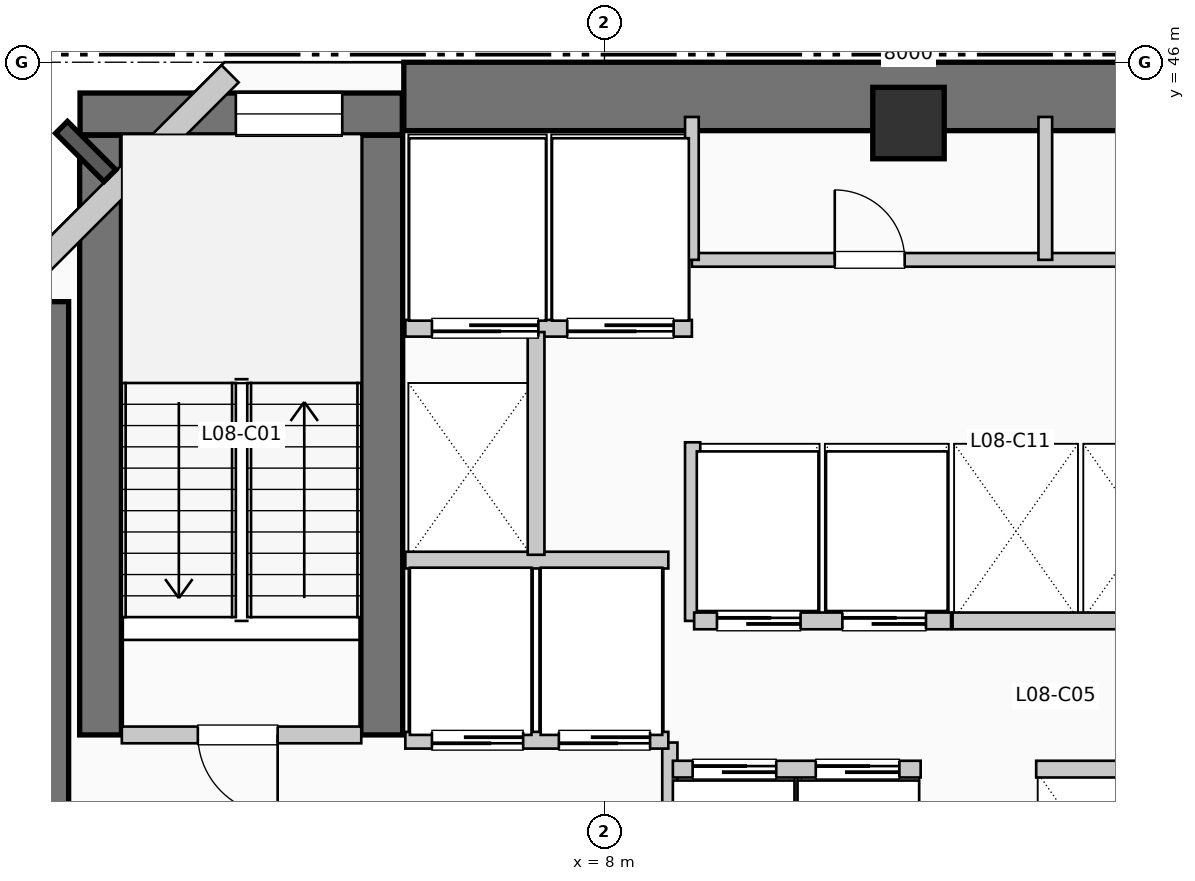
"""IFC4 building model, lengths in metres.
Left out: names, types, materials, properties, quantities, classifications, styles, units other than length and angle.
Written with IfcOpenShell. Run it as: python <this file> out.ifc"""

import sys

from ifc_helpers import new_model, si_unit, direction, frame, frame_2d, origin, origin_2d, place, context, subcontext, project, spatial, rectangle, extrude, element, fill, save


model = new_model("IFC4")
c1 = context("Model", 3, precision=1e-05, world=origin(), true_north=direction((0.0, 1.0)))
c2 = subcontext(c1, "Body", "Model", "MODEL_VIEW")
j1 = project(units=[si_unit("LENGTHUNIT", "METRE"), si_unit("PLANEANGLEUNIT", "RADIAN")], contexts=[c1])
p1 = place(None, origin())
s1 = spatial("IfcSite", under=j1, at=p1, CompositionType="ELEMENT")
p2 = place(p1, origin())
s2 = spatial("IfcBuilding", under=s1, at=p2, CompositionType="ELEMENT")
p3 = place(p2, frame((0.0, 0.0, 38.28)))
s3 = spatial("IfcBuildingStorey", under=s2, at=p3, CompositionType="ELEMENT", Elevation=38.28)
p4 = place(p3, frame((5.36, 45.55, 0.0), z_axis=(0.0, 0.0, 1.0), x_axis=(1.0, 0.0, 0.0)))
e1 = element("IfcWall", 1, at=p4, inside=s3, PredefinedType="SHEAR", context=c2, shape_type="SweptSolid", body=[
    extrude(rectangle(XDim=13.98, YDim=0.9, at=frame_2d((6.99, 0.0))), origin(), (0.0, 0.0, 1.0), 3.96),
])
p5 = place(p3, frame((0.5, 34.95, 0.0), z_axis=(0.0, 0.0, 1.0), x_axis=(0.0, 1.0, 0.0)))
e2 = element("IfcWall", 2, at=p5, inside=s3, PredefinedType="SHEAR", context=c2, shape_type="SweptSolid", body=[
    extrude(rectangle(XDim=7.9, YDim=0.9, at=frame_2d((3.95, 0.0))), origin(), (0.0, 0.0, 1.0), 3.96),
])
for number, where, z_axis, x_axis in (
    (3, (1.37, 37.15, 0.0), (0.0, 0.0, 1.0), (0.0, 1.0, 0.0)),
    (4, (5.07, 37.15, 0.0), (0.0, 0.0, 1.0), (0.0, 1.0, 0.0)),
):
    element("IfcWall", number, at=place(p3, frame(where, z_axis=z_axis, x_axis=x_axis)), inside=s3, PredefinedType="SHEAR", context=c2, shape_type="SweptSolid", body=[
        extrude(rectangle(XDim=7.89, YDim=0.55, at=frame_2d((3.945, 0.0))), origin(), (0.0, 0.0, 1.0), 3.96),
    ])
p6 = place(p3, frame((1.1, 45.32, 0.0), z_axis=(0.0, 0.0, 1.0), x_axis=(1.0, 0.0, 0.0)))
e5 = element("IfcWall", 5, at=p6, inside=s3, PredefinedType="SHEAR", context=c2, shape_type="SweptSolid", body=[
    extrude(rectangle(XDim=4.24, YDim=0.55, at=frame_2d((2.12, 0.0))), origin(), (0.0, 0.0, 1.0), 3.96),
])
p7 = place(p6, frame((2.05, 0.0, 1.05)))
e6 = element("IfcOpeningElement", 6, at=p7, cuts=e5, PredefinedType="OPENING", context=c2, shape_type="SweptSolid", body=[
    extrude(rectangle(XDim=1.4, YDim=1.8, at=frame_2d((0.7, 0.9))), frame((0.0, 0.285, 0.0), z_axis=(0.0, -1.0, 0.0), x_axis=(1.0, 0.0, 0.0)), (0.0, 0.0, 1.0), 0.57),
])
p8 = place(p3, frame((12.0, 45.2, 0.0), z_axis=(0.0, 0.0, 1.0), x_axis=(1.0, 0.0, 0.0)))
e7 = element("IfcColumn", 7, at=p8, inside=s3, PredefinedType="COLUMN", context=c2, shape_type="SweptSolid", body=[
    extrude(rectangle(XDim=0.94, YDim=0.94, at=origin_2d()), origin(), (0.0, 0.0, 1.0), 3.96),
])
p9 = place(p3, frame((3.074, 45.848, 0.0), z_axis=(0.0, 0.0, 1.0), x_axis=(-0.707106781187, -0.707106781187, 0.0)))
e8 = element("IfcWall", 8, at=p9, inside=s3, PredefinedType="SOLIDWALL", context=c2, shape_type="SweptSolid", body=[
    extrude(rectangle(XDim=4.133, YDim=0.32, at=frame_2d((2.066, 0.0))), origin(), (0.0, 0.0, 1.0), 3.71),
])
p10 = place(p3, frame((1.65, 37.15, 0.0), z_axis=(0.0, 0.0, 1.0), x_axis=(1.0, 0.0, 0.0)))
e9 = element("IfcWall", 9, at=p10, inside=s3, PredefinedType="PARTITIONING", context=c2, shape_type="SweptSolid", body=[
    extrude(rectangle(XDim=3.15, YDim=0.22, at=frame_2d((1.575, 0.0))), origin(), (0.0, 0.0, 1.0), 3.71),
])
p11 = place(p10, frame((2.05, 0.0, 0.0), z_axis=(0.0, 0.0, 1.0), x_axis=(-1.0, 0.0, 0.0)))
e10 = element("IfcOpeningElement", 10, at=p11, cuts=e9, PredefinedType="OPENING", context=c2, shape_type="SweptSolid", body=[
    extrude(rectangle(XDim=1.05, YDim=2.15, at=frame_2d((0.525, 1.075))), frame((0.0, 0.12, 0.0), z_axis=(0.0, -1.0, 0.0), x_axis=(1.0, 0.0, 0.0)), (0.0, 0.0, 1.0), 0.24),
])
p12 = place(p3, frame((8.86, 34.55, 0.0), z_axis=(0.0, 0.0, 1.0), x_axis=(0.0, 1.0, 0.0)))
e11 = element("IfcWall", 11, at=p12, inside=s3, PredefinedType="PARTITIONING", context=c2, shape_type="SweptSolid", body=[
    extrude(rectangle(XDim=2.5, YDim=0.2, at=frame_2d((1.25, 0.0))), origin(), (0.0, 0.0, 1.0), 3.71),
])
p13 = place(p3, frame((5.38, 37.08, 0.0), z_axis=(0.0, 0.0, 1.0), x_axis=(1.0, 0.0, 0.0)))
e12 = element("IfcWall", 12, at=p13, inside=s3, PredefinedType="PARTITIONING", context=c2, shape_type="SweptSolid", body=[
    extrude(rectangle(XDim=3.46, YDim=0.22, at=frame_2d((1.73, 0.0))), origin(), (0.0, 0.0, 1.0), 3.71),
])
p14 = place(p13, frame((1.55, 0.0, 0.0), z_axis=(0.0, 0.0, 1.0), x_axis=(-1.0, 0.0, 0.0)))
e13 = element("IfcOpeningElement", 13, at=p14, cuts=e12, PredefinedType="OPENING", context=c2, shape_type="SweptSolid", body=[
    extrude(rectangle(XDim=1.2, YDim=2.2, at=frame_2d((0.6, 1.1))), frame((0.0, 0.12, 0.0), z_axis=(0.0, -1.0, 0.0), x_axis=(1.0, 0.0, 0.0)), (0.0, 0.0, 1.0), 0.24),
])
p15 = place(p13, frame((3.22, 0.0, 0.0), z_axis=(0.0, 0.0, 1.0), x_axis=(-1.0, 0.0, 0.0)))
e14 = element("IfcOpeningElement", 14, at=p15, cuts=e12, PredefinedType="OPENING", context=c2, shape_type="SweptSolid", body=[
    extrude(rectangle(XDim=1.2, YDim=2.2, at=frame_2d((0.6, 1.1))), frame((0.0, 0.12, 0.0), z_axis=(0.0, -1.0, 0.0), x_axis=(1.0, 0.0, 0.0)), (0.0, 0.0, 1.0), 0.24),
])
p16 = place(p3, frame((5.38, 39.45, 0.0), z_axis=(0.0, 0.0, 1.0), x_axis=(1.0, 0.0, 0.0)))
e15 = element("IfcWall", 15, at=p16, inside=s3, PredefinedType="PARTITIONING", context=c2, shape_type="SweptSolid", body=[
    extrude(rectangle(XDim=3.46, YDim=0.22, at=frame_2d((1.73, 0.0))), origin(), (0.0, 0.0, 1.0), 3.71),
])
p17 = place(p3, frame((5.38, 42.5, 0.0), z_axis=(0.0, 0.0, 1.0), x_axis=(1.0, 0.0, 0.0)))
e16 = element("IfcWall", 16, at=p17, inside=s3, PredefinedType="PARTITIONING", context=c2, shape_type="SweptSolid", body=[
    extrude(rectangle(XDim=3.77, YDim=0.22, at=frame_2d((1.885, 0.0))), origin(), (0.0, 0.0, 1.0), 3.71),
])
p18 = place(p17, frame((1.75, 0.0, 0.0), z_axis=(0.0, 0.0, 1.0), x_axis=(-1.0, 0.0, 0.0)))
e17 = element("IfcOpeningElement", 17, at=p18, cuts=e16, PredefinedType="OPENING", context=c2, shape_type="SweptSolid", body=[
    extrude(rectangle(XDim=1.4, YDim=2.2, at=frame_2d((0.7, 1.1))), frame((0.0, 0.12, 0.0), z_axis=(0.0, -1.0, 0.0), x_axis=(1.0, 0.0, 0.0)), (0.0, 0.0, 1.0), 0.24),
])
p19 = place(p17, frame((3.53, 0.0, 0.0), z_axis=(0.0, 0.0, 1.0), x_axis=(-1.0, 0.0, 0.0)))
e18 = element("IfcOpeningElement", 18, at=p19, cuts=e16, PredefinedType="OPENING", context=c2, shape_type="SweptSolid", body=[
    extrude(rectangle(XDim=1.4, YDim=2.2, at=frame_2d((0.7, 1.1))), frame((0.0, 0.12, 0.0), z_axis=(0.0, -1.0, 0.0), x_axis=(1.0, 0.0, 0.0)), (0.0, 0.0, 1.0), 0.24),
])
p20 = place(p3, frame((7.1, 39.52, 0.0), z_axis=(0.0, 0.0, 1.0), x_axis=(0.0, 1.0, 0.0)))
e19 = element("IfcWall", 19, at=p20, inside=s3, PredefinedType="PARTITIONING", context=c2, shape_type="SweptSolid", body=[
    extrude(rectangle(XDim=2.93, YDim=0.22, at=frame_2d((1.465, 0.0))), origin(), (0.0, 0.0, 1.0), 3.71),
])
p21 = place(p3, frame((9.16, 38.65, 0.0), z_axis=(0.0, 0.0, 1.0), x_axis=(0.0, 1.0, 0.0)))
e20 = element("IfcWall", 20, at=p21, inside=s3, PredefinedType="PARTITIONING", context=c2, shape_type="SweptSolid", body=[
    extrude(rectangle(XDim=2.35, YDim=0.2, at=frame_2d((1.175, 0.0))), origin(), (0.0, 0.0, 1.0), 3.71),
])
p22 = place(p3, frame((8.9, 36.7, 0.0), z_axis=(0.0, 0.0, 1.0), x_axis=(1.0, 0.0, 0.0)))
e21 = element("IfcWall", 21, at=p22, inside=s3, PredefinedType="PARTITIONING", context=c2, shape_type="SweptSolid", body=[
    extrude(rectangle(XDim=3.26, YDim=0.22, at=frame_2d((1.63, 0.0))), origin(), (0.0, 0.0, 1.0), 3.71),
])
p23 = place(p22, frame((0.26, 0.0, 0.0)))
e22 = element("IfcOpeningElement", 22, at=p23, cuts=e21, PredefinedType="OPENING", context=c2, shape_type="SweptSolid", body=[
    extrude(rectangle(XDim=1.1, YDim=2.2, at=frame_2d((0.55, 1.1))), frame((0.0, 0.12, 0.0), z_axis=(0.0, -1.0, 0.0), x_axis=(1.0, 0.0, 0.0)), (0.0, 0.0, 1.0), 0.24),
])
p24 = place(p22, frame((1.88, 0.0, 0.0)))
e23 = element("IfcOpeningElement", 23, at=p24, cuts=e21, PredefinedType="OPENING", context=c2, shape_type="SweptSolid", body=[
    extrude(rectangle(XDim=1.1, YDim=2.2, at=frame_2d((0.55, 1.1))), frame((0.0, 0.12, 0.0), z_axis=(0.0, -1.0, 0.0), x_axis=(1.0, 0.0, 0.0)), (0.0, 0.0, 1.0), 0.24),
])
p25 = place(p3, frame((9.18, 38.65, 0.0), z_axis=(0.0, 0.0, 1.0), x_axis=(1.0, 0.0, 0.0)))
e24 = element("IfcWall", 24, at=p25, inside=s3, PredefinedType="PARTITIONING", context=c2, shape_type="SweptSolid", body=[
    extrude(rectangle(XDim=3.38, YDim=0.22, at=frame_2d((1.69, 0.0))), origin(), (0.0, 0.0, 1.0), 3.71),
])
p26 = place(p25, frame((0.3, 0.0, 0.0)))
e25 = element("IfcOpeningElement", 25, at=p26, cuts=e24, PredefinedType="OPENING", context=c2, shape_type="SweptSolid", body=[
    extrude(rectangle(XDim=1.1, YDim=2.2, at=frame_2d((0.55, 1.1))), frame((0.0, 0.12, 0.0), z_axis=(0.0, -1.0, 0.0), x_axis=(1.0, 0.0, 0.0)), (0.0, 0.0, 1.0), 0.24),
])
p27 = place(p25, frame((1.95, 0.0, 0.0)))
e26 = element("IfcOpeningElement", 26, at=p27, cuts=e24, PredefinedType="OPENING", context=c2, shape_type="SweptSolid", body=[
    extrude(rectangle(XDim=1.1, YDim=2.2, at=frame_2d((0.55, 1.1))), frame((0.0, 0.12, 0.0), z_axis=(0.0, -1.0, 0.0), x_axis=(1.0, 0.0, 0.0)), (0.0, 0.0, 1.0), 0.24),
])
p28 = place(p3, frame((13.68, 36.7, 0.0), z_axis=(0.0, 0.0, 1.0), x_axis=(1.0, 0.0, 0.0)))
e27 = element("IfcWall", 27, at=p28, inside=s3, PredefinedType="PARTITIONING", context=c2, shape_type="SweptSolid", body=[
    extrude(rectangle(XDim=3.28, YDim=0.22, at=frame_2d((1.64, 0.0))), origin(), (0.0, 0.0, 1.0), 3.71),
])
p29 = place(p3, frame((12.58, 38.65, 0.0), z_axis=(0.0, 0.0, 1.0), x_axis=(1.0, 0.0, 0.0)))
e28 = element("IfcWall", 28, at=p29, inside=s3, PredefinedType="PARTITIONING", context=c2, shape_type="SweptSolid", body=[
    extrude(rectangle(XDim=3.38, YDim=0.22, at=frame_2d((1.69, 0.0))), origin(), (0.0, 0.0, 1.0), 3.71),
])
p30 = place(p3, frame((9.15, 43.4, 0.0), z_axis=(0.0, 0.0, 1.0), x_axis=(1.0, 0.0, 0.0)))
e29 = element("IfcWall", 29, at=p30, inside=s3, PredefinedType="PLUMBINGWALL", context=c2, shape_type="SweptSolid", body=[
    extrude(rectangle(XDim=9.33, YDim=0.18, at=frame_2d((4.665, 0.0))), origin(), (0.0, 0.0, 1.0), 3.71),
])
p31 = place(p30, frame((1.88, 0.0, 0.0)))
e30 = element("IfcOpeningElement", 30, at=p31, cuts=e29, PredefinedType="OPENING", context=c2, shape_type="SweptSolid", body=[
    extrude(rectangle(XDim=0.92, YDim=2.1, at=frame_2d((0.46, 1.05))), frame((0.0, 0.1, 0.0), z_axis=(0.0, -1.0, 0.0), x_axis=(1.0, 0.0, 0.0)), (0.0, 0.0, 1.0), 0.2),
])
p32 = place(p30, frame((6.515, 0.0, 0.0)))
e31 = element("IfcOpeningElement", 31, at=p32, cuts=e29, PredefinedType="OPENING", context=c2, shape_type="SweptSolid", body=[
    extrude(rectangle(XDim=0.92, YDim=2.1, at=frame_2d((0.46, 1.05))), frame((0.0, 0.1, 0.0), z_axis=(0.0, -1.0, 0.0), x_axis=(1.0, 0.0, 0.0)), (0.0, 0.0, 1.0), 0.2),
])
for number, where, z_axis, x_axis in (
    (32, (9.15, 43.4, 0.0), (0.0, 0.0, 1.0), (0.0, 1.0, 0.0)),
    (33, (13.8, 43.4, 0.0), (0.0, 0.0, 1.0), (0.0, 1.0, 0.0)),
):
    element("IfcWall", number, at=place(p3, frame(where, z_axis=z_axis, x_axis=x_axis)), inside=s3, PredefinedType="PLUMBINGWALL", context=c2, shape_type="SweptSolid", body=[
        extrude(rectangle(XDim=1.88, YDim=0.18, at=frame_2d((0.94, 0.0))), origin(), (0.0, 0.0, 1.0), 3.71),
    ])
p33 = place(p7, origin())
e34 = element("IfcWindow", 34, at=p33, inside=s3, PartitioningType="SINGLE_PANEL", PredefinedType="WINDOW", context=c2, shape_type="SweptSolid", body=[
    extrude(rectangle(XDim=1.4, YDim=1.8, at=frame_2d((0.7, 0.9))), frame((0.0, 0.03, 0.0), z_axis=(0.0, -1.0, 0.0), x_axis=(1.0, 0.0, 0.0)), (0.0, 0.0, 1.0), 0.06),
])
fill(e6, e34)
p34 = place(p11, origin())
e35 = element("IfcDoor", 35, at=p34, inside=s3, OperationType="SINGLE_SWING_RIGHT", PredefinedType="DOOR", context=c2, shape_type="SweptSolid", body=[
    extrude(rectangle(XDim=1.05, YDim=2.15, at=frame_2d((0.525, 1.075))), frame((0.0, 0.025, 0.0), z_axis=(0.0, -1.0, 0.0), x_axis=(1.0, 0.0, 0.0)), (0.0, 0.0, 1.0), 0.05),
])
fill(e10, e35)
p35 = place(p14, origin())
e36 = element("IfcDoor", 36, at=p35, inside=s3, OperationType="SLIDING_TO_RIGHT", PredefinedType="DOOR", context=c2, shape_type="SweptSolid", body=[
    extrude(rectangle(XDim=1.2, YDim=2.2, at=frame_2d((0.6, 1.1))), frame((0.0, 0.025, 0.0), z_axis=(0.0, -1.0, 0.0), x_axis=(1.0, 0.0, 0.0)), (0.0, 0.0, 1.0), 0.05),
])
fill(e13, e36)
p36 = place(p15, origin())
e37 = element("IfcDoor", 37, at=p36, inside=s3, OperationType="SLIDING_TO_RIGHT", PredefinedType="DOOR", context=c2, shape_type="SweptSolid", body=[
    extrude(rectangle(XDim=1.2, YDim=2.2, at=frame_2d((0.6, 1.1))), frame((0.0, 0.025, 0.0), z_axis=(0.0, -1.0, 0.0), x_axis=(1.0, 0.0, 0.0)), (0.0, 0.0, 1.0), 0.05),
])
fill(e14, e37)
p37 = place(p18, origin())
e38 = element("IfcDoor", 38, at=p37, inside=s3, OperationType="SLIDING_TO_LEFT", PredefinedType="DOOR", context=c2, shape_type="SweptSolid", body=[
    extrude(rectangle(XDim=1.4, YDim=2.2, at=frame_2d((0.7, 1.1))), frame((0.0, 0.025, 0.0), z_axis=(0.0, -1.0, 0.0), x_axis=(1.0, 0.0, 0.0)), (0.0, 0.0, 1.0), 0.05),
])
fill(e17, e38)
p38 = place(p19, origin())
e39 = element("IfcDoor", 39, at=p38, inside=s3, OperationType="SLIDING_TO_LEFT", PredefinedType="DOOR", context=c2, shape_type="SweptSolid", body=[
    extrude(rectangle(XDim=1.4, YDim=2.2, at=frame_2d((0.7, 1.1))), frame((0.0, 0.025, 0.0), z_axis=(0.0, -1.0, 0.0), x_axis=(1.0, 0.0, 0.0)), (0.0, 0.0, 1.0), 0.05),
])
fill(e18, e39)
p39 = place(p23, origin())
e40 = element("IfcDoor", 40, at=p39, inside=s3, OperationType="SLIDING_TO_LEFT", PredefinedType="DOOR", context=c2, shape_type="SweptSolid", body=[
    extrude(rectangle(XDim=1.1, YDim=2.2, at=frame_2d((0.55, 1.1))), frame((0.0, 0.025, 0.0), z_axis=(0.0, -1.0, 0.0), x_axis=(1.0, 0.0, 0.0)), (0.0, 0.0, 1.0), 0.05),
])
fill(e22, e40)
p40 = place(p24, origin())
e41 = element("IfcDoor", 41, at=p40, inside=s3, OperationType="SLIDING_TO_LEFT", PredefinedType="DOOR", context=c2, shape_type="SweptSolid", body=[
    extrude(rectangle(XDim=1.1, YDim=2.2, at=frame_2d((0.55, 1.1))), frame((0.0, 0.025, 0.0), z_axis=(0.0, -1.0, 0.0), x_axis=(1.0, 0.0, 0.0)), (0.0, 0.0, 1.0), 0.05),
])
fill(e23, e41)
p41 = place(p26, origin())
e42 = element("IfcDoor", 42, at=p41, inside=s3, OperationType="SLIDING_TO_LEFT", PredefinedType="DOOR", context=c2, shape_type="SweptSolid", body=[
    extrude(rectangle(XDim=1.1, YDim=2.2, at=frame_2d((0.55, 1.1))), frame((0.0, 0.025, 0.0), z_axis=(0.0, -1.0, 0.0), x_axis=(1.0, 0.0, 0.0)), (0.0, 0.0, 1.0), 0.05),
])
fill(e25, e42)
p42 = place(p27, origin())
e43 = element("IfcDoor", 43, at=p42, inside=s3, OperationType="SLIDING_TO_LEFT", PredefinedType="DOOR", context=c2, shape_type="SweptSolid", body=[
    extrude(rectangle(XDim=1.1, YDim=2.2, at=frame_2d((0.55, 1.1))), frame((0.0, 0.025, 0.0), z_axis=(0.0, -1.0, 0.0), x_axis=(1.0, 0.0, 0.0)), (0.0, 0.0, 1.0), 0.05),
])
fill(e26, e43)
p43 = place(p31, origin())
e44 = element("IfcDoor", 44, at=p43, inside=s3, OperationType="SINGLE_SWING_LEFT", PredefinedType="DOOR", context=c2, shape_type="SweptSolid", body=[
    extrude(rectangle(XDim=0.92, YDim=2.1, at=frame_2d((0.46, 1.05))), frame((0.0, 0.025, 0.0), z_axis=(0.0, -1.0, 0.0), x_axis=(1.0, 0.0, 0.0)), (0.0, 0.0, 1.0), 0.05),
])
fill(e30, e44)
save(model, sys.argv[1])
